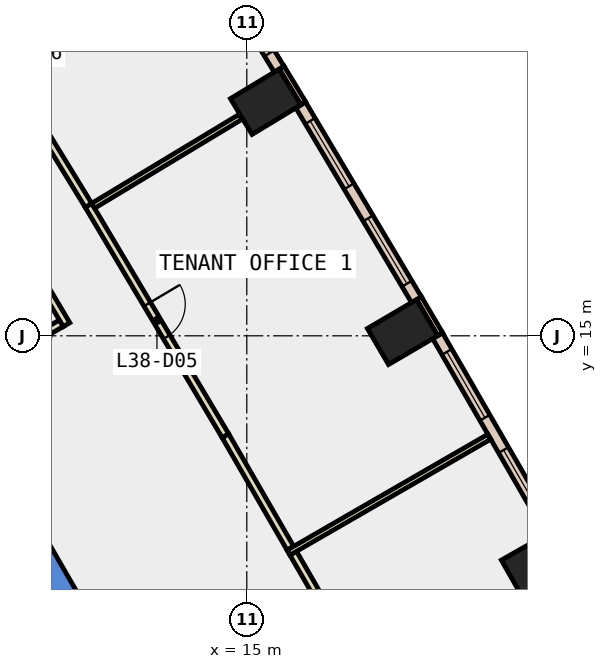
"""IFC4 building model, lengths in metres.
Left out: names, types, materials, properties, quantities, classifications, styles, units other than length and angle.
Written with IfcOpenShell. Run it as: python <this file> out.ifc"""

import sys

from ifc_helpers import new_model, si_unit, direction, frame, frame_2d, origin, origin_2d, place, context, subcontext, project, spatial, polyline, rectangle, outline, extrude, element, fill, save


model = new_model("IFC4")
c1 = context("Model", 3, precision=1e-05, world=origin(), true_north=direction((0.0, 1.0)))
c2 = subcontext(c1, "Body", "Model", "MODEL_VIEW")
j1 = project(units=[si_unit("LENGTHUNIT", "METRE"), si_unit("PLANEANGLEUNIT", "RADIAN")], contexts=[c1])
p1 = place(None, origin())
s1 = spatial("IfcSite", under=j1, at=p1, CompositionType="ELEMENT")
p2 = place(p1, origin())
s2 = spatial("IfcBuilding", under=s1, at=p2, CompositionType="ELEMENT")
p3 = place(p2, frame((0.0, 0.0, 171.8)))
s3 = spatial("IfcBuildingStorey", under=s2, at=p3, CompositionType="ELEMENT", Elevation=171.8)
for number, where, z_axis, x_axis in (
    (1, (22.623, 8.991, -0.4), (0.0, 0.0, 1.0), (-0.494, 0.869, 0.0)),
    (2, (19.099, 15.098, -0.4), (0.0, 0.0, 1.0), (-0.506, 0.863, 0.0)),
    (3, (15.496, 21.158, -0.4), (0.0, 0.0, 1.0), (-0.518, 0.855, 0.0)),
):
    element("IfcColumn", number, at=place(p3, frame(where, z_axis=z_axis, x_axis=x_axis)), inside=s3, PredefinedType="COLUMN", context=c2, shape_type="SweptSolid", body=[
        extrude(rectangle(XDim=1.1, YDim=1.5, at=origin_2d()), origin(), (0.0, 0.0, 1.0), 4.2),
    ])
p4 = place(p3, frame((0.0, 0.0, -0.4)))
e4 = element("IfcWall", 4, at=p4, inside=s3, PredefinedType="SHEAR", context=c2, shape_type="SweptSolid", body=[
    extrude(outline(polyline([(8.517, 11.748), (7.824, 11.348), (12.933, 2.5), (13.856, 2.5), (8.517, 11.748)])), origin(), (0.0, 0.0, 1.0), 4.2),
])
p5 = place(p3, frame((20.089, 15.041, 0.0), z_axis=(0.0, 0.0, 1.0), x_axis=(-0.50667077411, 0.862139621327, 0.0)))
e5 = element("IfcWall", 5, at=p5, inside=s3, PredefinedType="STANDARD", context=c2, shape_type="SweptSolid", body=[
    extrude(rectangle(XDim=1.1, YDim=0.15, at=frame_2d((0.55, 0.0))), origin(), (0.0, 0.0, 1.0), 3.8),
])
p6 = place(p3, frame((16.487, 21.115, 0.0), z_axis=(0.0, 0.0, 1.0), x_axis=(-0.518178754102, 0.855272341888, 0.0)))
e6 = element("IfcWall", 6, at=p6, inside=s3, PredefinedType="STANDARD", context=c2, shape_type="SweptSolid", body=[
    extrude(rectangle(XDim=1.1, YDim=0.15, at=frame_2d((0.55, 0.0))), origin(), (0.0, 0.0, 1.0), 3.8),
])
p7 = place(p3, frame((23.001, 9.837, 0.0), z_axis=(0.0, 0.0, 1.0), x_axis=(-0.49986421087, 0.866103787482, 0.0)))
e7 = element("IfcWall", 7, at=p7, inside=s3, PredefinedType="STANDARD", context=c2, shape_type="SweptSolid", body=[
    extrude(rectangle(XDim=5.964, YDim=0.3, at=frame_2d((2.982, 0.0))), origin(), (0.0, 0.0, 1.0), 3.8),
])
p8 = place(p7, frame((0.491, 0.0, 0.9)))
e8 = element("IfcOpeningElement", 8, at=p8, cuts=e7, PredefinedType="OPENING", context=c2, shape_type="SweptSolid", body=[
    extrude(rectangle(XDim=2.0, YDim=2.6, at=frame_2d((1.0, 1.3))), frame((0.0, 0.16, 0.0), z_axis=(0.0, -1.0, 0.0), x_axis=(1.0, 0.0, 0.0)), (0.0, 0.0, 1.0), 0.32),
])
p9 = place(p7, frame((3.473, 0.0, 0.9)))
e9 = element("IfcOpeningElement", 9, at=p9, cuts=e7, PredefinedType="OPENING", context=c2, shape_type="SweptSolid", body=[
    extrude(rectangle(XDim=2.0, YDim=2.6, at=frame_2d((1.0, 1.3))), frame((0.0, 0.16, 0.0), z_axis=(0.0, -1.0, 0.0), x_axis=(1.0, 0.0, 0.0)), (0.0, 0.0, 1.0), 0.32),
])
p10 = place(p3, frame((19.465, 15.949, 0.0), z_axis=(0.0, 0.0, 1.0), x_axis=(-0.511053317394, 0.8595490136, 0.0)))
e10 = element("IfcWall", 10, at=p10, inside=s3, PredefinedType="STANDARD", context=c2, shape_type="SweptSolid", body=[
    extrude(rectangle(XDim=5.962, YDim=0.3, at=frame_2d((2.981, 0.0))), origin(), (0.0, 0.0, 1.0), 3.8),
])
p11 = place(p10, frame((0.491, 0.0, 0.9)))
e11 = element("IfcOpeningElement", 11, at=p11, cuts=e10, PredefinedType="OPENING", context=c2, shape_type="SweptSolid", body=[
    extrude(rectangle(XDim=2.0, YDim=2.6, at=frame_2d((1.0, 1.3))), frame((0.0, 0.16, 0.0), z_axis=(0.0, -1.0, 0.0), x_axis=(1.0, 0.0, 0.0)), (0.0, 0.0, 1.0), 0.32),
])
p12 = place(p10, frame((3.472, 0.0, 0.9)))
e12 = element("IfcOpeningElement", 12, at=p12, cuts=e10, PredefinedType="OPENING", context=c2, shape_type="SweptSolid", body=[
    extrude(rectangle(XDim=2.0, YDim=2.6, at=frame_2d((1.0, 1.3))), frame((0.0, 0.16, 0.0), z_axis=(0.0, -1.0, 0.0), x_axis=(1.0, 0.0, 0.0)), (0.0, 0.0, 1.0), 0.32),
])
p13 = place(p3, frame((15.851, 22.015, 0.0), z_axis=(0.0, 0.0, 1.0), x_axis=(-0.522156898008, 0.852849443842, 0.0)))
e13 = element("IfcWall", 13, at=p13, inside=s3, PredefinedType="STANDARD", context=c2, shape_type="SweptSolid", body=[
    extrude(rectangle(XDim=5.964, YDim=0.3, at=frame_2d((2.982, 0.0))), origin(), (0.0, 0.0, 1.0), 3.8),
])
p14 = place(p13, frame((0.491, 0.0, 0.9)))
e14 = element("IfcOpeningElement", 14, at=p14, cuts=e13, PredefinedType="OPENING", context=c2, shape_type="SweptSolid", body=[
    extrude(rectangle(XDim=2.0, YDim=2.6, at=frame_2d((1.0, 1.3))), frame((0.0, 0.16, 0.0), z_axis=(0.0, -1.0, 0.0), x_axis=(1.0, 0.0, 0.0)), (0.0, 0.0, 1.0), 0.32),
])
p15 = place(p13, frame((3.473, 0.0, 0.9)))
e15 = element("IfcOpeningElement", 15, at=p15, cuts=e13, PredefinedType="OPENING", context=c2, shape_type="SweptSolid", body=[
    extrude(rectangle(XDim=2.0, YDim=2.6, at=frame_2d((1.0, 1.3))), frame((0.0, 0.16, 0.0), z_axis=(0.0, -1.0, 0.0), x_axis=(1.0, 0.0, 0.0)), (0.0, 0.0, 1.0), 0.32),
])
p16 = place(p3, frame((9.809, 15.15, 0.0), z_axis=(0.0, 0.0, 1.0), x_axis=(0.866479829667, 0.499212083968, 0.0)))
e16 = element("IfcWall", 16, at=p16, inside=s3, PredefinedType="PARTITIONING", context=c2, shape_type="SweptSolid", body=[
    extrude(rectangle(XDim=0.359, YDim=0.2, at=frame_2d((0.179, 0.0))), origin(), (0.0, 0.0, 1.0), 3.8),
])
p17 = place(p3, frame((10.257, 15.293, 0.0), z_axis=(0.0, 0.0, 1.0), x_axis=(-0.510974411771, 0.859595922812, 0.0)))
e17 = element("IfcWall", 17, at=p17, inside=s3, PredefinedType="PARTITIONING", context=c2, shape_type="SweptSolid", body=[
    extrude(rectangle(XDim=2.317, YDim=0.2, at=frame_2d((1.159, 0.0))), origin(), (0.0, 0.0, 1.0), 3.8),
])
p18 = place(p3, frame((16.222, 9.28, 0.0), z_axis=(0.0, 0.0, 1.0), x_axis=(0.499920397431, -0.866071357471, 0.0)))
e18 = element("IfcWall", 18, at=p18, inside=s3, PredefinedType="PARTITIONING", context=c2, shape_type="SweptSolid", body=[
    extrude(rectangle(XDim=3.417, YDim=0.2, at=frame_2d((1.708, 0.0))), origin(), (0.0, 0.0, 1.0), 3.8),
])
p19 = place(p3, frame((10.833, 18.434, 0.0), z_axis=(0.0, 0.0, 1.0), x_axis=(0.510975915649, -0.859595028852, 0.0)))
e19 = element("IfcWall", 19, at=p19, inside=s3, PredefinedType="PARTITIONING", context=c2, shape_type="SweptSolid", body=[
    extrude(rectangle(XDim=7.057, YDim=0.2, at=frame_2d((3.528, 0.0))), origin(), (0.0, 0.0, 1.0), 3.8),
])
p20 = place(p19, frame((3.028, 0.0, 0.0)))
e20 = element("IfcOpeningElement", 20, at=p20, cuts=e19, PredefinedType="OPENING", context=c2, shape_type="SweptSolid", body=[
    extrude(rectangle(XDim=1.0, YDim=2.1, at=frame_2d((0.5, 1.05))), frame((0.0, 0.11, 0.0), z_axis=(0.0, -1.0, 0.0), x_axis=(1.0, 0.0, 0.0)), (0.0, 0.0, 1.0), 0.22),
])
p21 = place(p3, frame((14.439, 12.368, 0.0), z_axis=(0.0, 0.0, 1.0), x_axis=(0.500044178772, -0.865999895656, 0.0)))
e21 = element("IfcWall", 21, at=p21, inside=s3, PredefinedType="PARTITIONING", context=c2, shape_type="SweptSolid", body=[
    extrude(rectangle(XDim=3.416, YDim=0.2, at=frame_2d((1.708, 0.0))), origin(), (0.0, 0.0, 1.0), 3.8),
])
p22 = place(p3, frame((7.226, 24.326, 0.0), z_axis=(0.0, 0.0, 1.0), x_axis=(0.52212028524, -0.852871858922, 0.0)))
e22 = element("IfcWall", 22, at=p22, inside=s3, PredefinedType="PARTITIONING", context=c2, shape_type="SweptSolid", body=[
    extrude(rectangle(XDim=6.908, YDim=0.2, at=frame_2d((3.454, 0.0))), origin(), (0.0, 0.0, 1.0), 3.8),
])
p23 = place(p22, frame((3.029, 0.0, 0.0)))
e23 = element("IfcOpeningElement", 23, at=p23, cuts=e22, PredefinedType="OPENING", context=c2, shape_type="SweptSolid", body=[
    extrude(rectangle(XDim=1.0, YDim=2.1, at=frame_2d((0.5, 1.05))), frame((0.0, 0.11, 0.0), z_axis=(0.0, -1.0, 0.0), x_axis=(1.0, 0.0, 0.0)), (0.0, 0.0, 1.0), 0.22),
])
p24 = place(p3, frame((16.098, 9.295, 0.0), z_axis=(0.0, 0.0, 1.0), x_axis=(0.866109615698, 0.499854112313, 0.0)))
e24 = element("IfcWall", 24, at=p24, inside=s3, PredefinedType="PARTITIONING", context=c2, shape_type="SweptSolid", body=[
    extrude(rectangle(XDim=6.1, YDim=0.15, at=frame_2d((3.05, 0.0))), origin(), (0.0, 0.0, 1.0), 3.8),
])
p25 = place(p3, frame((10.957, 18.421, 0.0), z_axis=(0.0, 0.0, 1.0), x_axis=(0.85624931053, 0.516562792134, 0.0)))
e25 = element("IfcWall", 25, at=p25, inside=s3, PredefinedType="PARTITIONING", context=c2, shape_type="SweptSolid", body=[
    extrude(rectangle(XDim=4.53, YDim=0.15, at=frame_2d((2.265, 0.0))), origin(), (0.0, 0.0, 1.0), 3.8),
])
p26 = place(p8, origin())
e26 = element("IfcWindow", 26, at=p26, inside=s3, PartitioningType="SINGLE_PANEL", PredefinedType="WINDOW", context=c2, shape_type="SweptSolid", body=[
    extrude(rectangle(XDim=2.0, YDim=2.6, at=frame_2d((1.0, 1.3))), frame((0.0, 0.03, 0.0), z_axis=(0.0, -1.0, 0.0), x_axis=(1.0, 0.0, 0.0)), (0.0, 0.0, 1.0), 0.06),
])
fill(e8, e26)
p27 = place(p9, origin())
e27 = element("IfcWindow", 27, at=p27, inside=s3, PartitioningType="SINGLE_PANEL", PredefinedType="WINDOW", context=c2, shape_type="SweptSolid", body=[
    extrude(rectangle(XDim=2.0, YDim=2.6, at=frame_2d((1.0, 1.3))), frame((0.0, 0.03, 0.0), z_axis=(0.0, -1.0, 0.0), x_axis=(1.0, 0.0, 0.0)), (0.0, 0.0, 1.0), 0.06),
])
fill(e9, e27)
p28 = place(p11, origin())
e28 = element("IfcWindow", 28, at=p28, inside=s3, PartitioningType="SINGLE_PANEL", PredefinedType="WINDOW", context=c2, shape_type="SweptSolid", body=[
    extrude(rectangle(XDim=2.0, YDim=2.6, at=frame_2d((1.0, 1.3))), frame((0.0, 0.03, 0.0), z_axis=(0.0, -1.0, 0.0), x_axis=(1.0, 0.0, 0.0)), (0.0, 0.0, 1.0), 0.06),
])
fill(e11, e28)
p29 = place(p12, origin())
e29 = element("IfcWindow", 29, at=p29, inside=s3, PartitioningType="SINGLE_PANEL", PredefinedType="WINDOW", context=c2, shape_type="SweptSolid", body=[
    extrude(rectangle(XDim=2.0, YDim=2.6, at=frame_2d((1.0, 1.3))), frame((0.0, 0.03, 0.0), z_axis=(0.0, -1.0, 0.0), x_axis=(1.0, 0.0, 0.0)), (0.0, 0.0, 1.0), 0.06),
])
fill(e12, e29)
p30 = place(p14, origin())
e30 = element("IfcWindow", 30, at=p30, inside=s3, PartitioningType="SINGLE_PANEL", PredefinedType="WINDOW", context=c2, shape_type="SweptSolid", body=[
    extrude(rectangle(XDim=2.0, YDim=2.6, at=frame_2d((1.0, 1.3))), frame((0.0, 0.03, 0.0), z_axis=(0.0, -1.0, 0.0), x_axis=(1.0, 0.0, 0.0)), (0.0, 0.0, 1.0), 0.06),
])
fill(e14, e30)
p31 = place(p20, origin())
e31 = element("IfcDoor", 31, at=p31, inside=s3, OperationType="SINGLE_SWING_LEFT", PredefinedType="DOOR", context=c2, shape_type="SweptSolid", body=[
    extrude(rectangle(XDim=1.0, YDim=2.1, at=frame_2d((0.5, 1.05))), frame((0.0, 0.025, 0.0), z_axis=(0.0, -1.0, 0.0), x_axis=(1.0, 0.0, 0.0)), (0.0, 0.0, 1.0), 0.05),
])
fill(e20, e31)
save(model, sys.argv[1])
